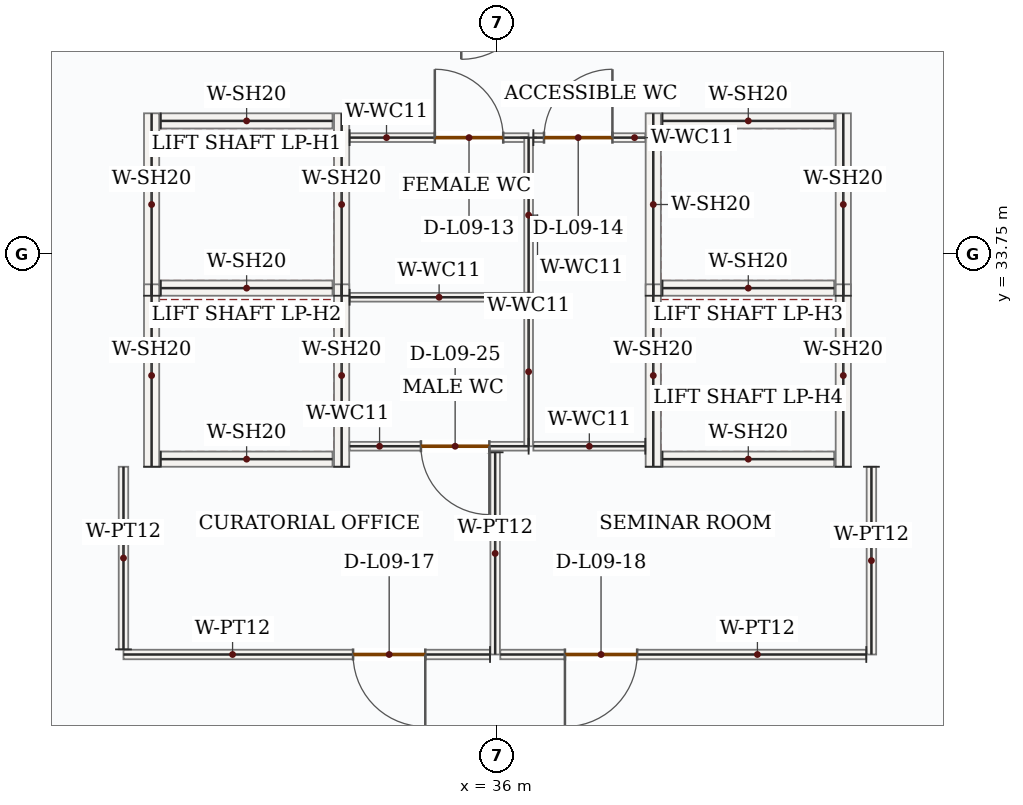
"""IFC4 building model, lengths in metres.
Left out: names, types, materials, properties, quantities, classifications, styles, units other than length and angle.
Written with IfcOpenShell. Run it as: python <this file> out.ifc"""

import sys

from ifc_helpers import new_model, si_unit, direction, frame, frame_2d, origin, place, context, subcontext, project, spatial, rectangle, extrude, source, transform, mapped, element, fill, save


model = new_model("IFC4")
c1 = context("Model", 3, precision=1e-05, world=origin(), true_north=direction((0.0, 1.0)))
c2 = subcontext(c1, "Body", "Model", "MODEL_VIEW")
j1 = project(units=[si_unit("LENGTHUNIT", "METRE"), si_unit("PLANEANGLEUNIT", "RADIAN")], contexts=[c1])
p1 = place(None, origin())
s1 = spatial("IfcSite", under=j1, at=p1, CompositionType="ELEMENT")
p2 = place(p1, origin())
s2 = spatial("IfcBuilding", under=s1, at=p2, CompositionType="ELEMENT")
p3 = place(p2, frame((0.0, 0.0, 45.9)))
s3 = spatial("IfcBuildingStorey", under=s2, at=p3, CompositionType="ELEMENT", Elevation=45.9)
m1 = source(origin(), c2, "Body", "SweptSolid", [
    extrude(rectangle(XDim=2.4, YDim=0.2, at=frame_2d((1.2, 0.0))), origin(), (0.0, 0.0, 1.0), 3.95),
])
for number, where, z_axis, x_axis in (
    (1, (31.45, 33.2, 0.0), (0.0, 0.0, 1.0), (0.0, 1.0, 0.0)),
    (2, (33.95, 33.2, 0.0), (0.0, 0.0, 1.0), (0.0, 1.0, 0.0)),
):
    element("IfcWall", number, at=place(p3, frame(where, z_axis=z_axis, x_axis=x_axis)), inside=s3, PredefinedType="SOLIDWALL", context=c2, shape_type="MappedRepresentation", body=[
        mapped(m1, transform((0.0, 0.0, 0.0), x_axis=(1.0, 0.0, 0.0), y_axis=(0.0, 1.0, 0.0), z_axis=(0.0, 0.0, 1.0), scale=1.0)),
    ])
m2 = source(origin(), c2, "Body", "SweptSolid", [
    extrude(rectangle(XDim=2.26, YDim=0.2, at=frame_2d((1.13, 0.0))), origin(), (0.0, 0.0, 1.0), 3.95),
])
for number, where, z_axis, x_axis in (
    (3, (31.57, 33.3, 0.0), (0.0, 0.0, 1.0), (1.0, 0.0, 0.0)),
    (4, (31.57, 35.5, 0.0), (0.0, 0.0, 1.0), (1.0, 0.0, 0.0)),
):
    element("IfcWall", number, at=place(p3, frame(where, z_axis=z_axis, x_axis=x_axis)), inside=s3, PredefinedType="SOLIDWALL", context=c2, shape_type="MappedRepresentation", body=[
        mapped(m2, transform((0.0, 0.0, 0.0), x_axis=(1.0, 0.0, 0.0), y_axis=(0.0, 1.0, 0.0), z_axis=(0.0, 0.0, 1.0), scale=1.0)),
    ])
for number, where, z_axis, x_axis in (
    (5, (31.45, 30.95, 0.0), (0.0, 0.0, 1.0), (0.0, 1.0, 0.0)),
    (6, (33.95, 30.95, 0.0), (0.0, 0.0, 1.0), (0.0, 1.0, 0.0)),
):
    element("IfcWall", number, at=place(p3, frame(where, z_axis=z_axis, x_axis=x_axis)), inside=s3, PredefinedType="SOLIDWALL", context=c2, shape_type="MappedRepresentation", body=[
        mapped(m1, transform((0.0, 0.0, 0.0), x_axis=(1.0, 0.0, 0.0), y_axis=(0.0, 1.0, 0.0), z_axis=(0.0, 0.0, 1.0), scale=1.0)),
    ])
p4 = place(p3, frame((31.57, 31.05, 0.0), z_axis=(0.0, 0.0, 1.0), x_axis=(1.0, 0.0, 0.0)))
e7 = element("IfcWall", 7, at=p4, inside=s3, PredefinedType="SOLIDWALL", context=c2, shape_type="MappedRepresentation", body=[
    mapped(m2, transform((0.0, 0.0, 0.0), x_axis=(1.0, 0.0, 0.0), y_axis=(0.0, 1.0, 0.0), z_axis=(0.0, 0.0, 1.0), scale=1.0)),
])
for number, where, z_axis, x_axis in (
    (8, (38.05, 33.2, 0.0), (0.0, 0.0, 1.0), (0.0, 1.0, 0.0)),
    (9, (40.55, 33.2, 0.0), (0.0, 0.0, 1.0), (0.0, 1.0, 0.0)),
):
    element("IfcWall", number, at=place(p3, frame(where, z_axis=z_axis, x_axis=x_axis)), inside=s3, PredefinedType="SOLIDWALL", context=c2, shape_type="MappedRepresentation", body=[
        mapped(m1, transform((0.0, 0.0, 0.0), x_axis=(1.0, 0.0, 0.0), y_axis=(0.0, 1.0, 0.0), z_axis=(0.0, 0.0, 1.0), scale=1.0)),
    ])
for number, where, z_axis, x_axis in (
    (10, (38.17, 33.3, 0.0), (0.0, 0.0, 1.0), (1.0, 0.0, 0.0)),
    (11, (38.17, 35.5, 0.0), (0.0, 0.0, 1.0), (1.0, 0.0, 0.0)),
):
    element("IfcWall", number, at=place(p3, frame(where, z_axis=z_axis, x_axis=x_axis)), inside=s3, PredefinedType="SOLIDWALL", context=c2, shape_type="MappedRepresentation", body=[
        mapped(m2, transform((0.0, 0.0, 0.0), x_axis=(1.0, 0.0, 0.0), y_axis=(0.0, 1.0, 0.0), z_axis=(0.0, 0.0, 1.0), scale=1.0)),
    ])
for number, where, z_axis, x_axis in (
    (12, (38.05, 30.95, 0.0), (0.0, 0.0, 1.0), (0.0, 1.0, 0.0)),
    (13, (40.55, 30.95, 0.0), (0.0, 0.0, 1.0), (0.0, 1.0, 0.0)),
):
    element("IfcWall", number, at=place(p3, frame(where, z_axis=z_axis, x_axis=x_axis)), inside=s3, PredefinedType="SOLIDWALL", context=c2, shape_type="MappedRepresentation", body=[
        mapped(m1, transform((0.0, 0.0, 0.0), x_axis=(1.0, 0.0, 0.0), y_axis=(0.0, 1.0, 0.0), z_axis=(0.0, 0.0, 1.0), scale=1.0)),
    ])
p5 = place(p3, frame((38.17, 31.05, 0.0), z_axis=(0.0, 0.0, 1.0), x_axis=(1.0, 0.0, 0.0)))
e14 = element("IfcWall", 14, at=p5, inside=s3, PredefinedType="SOLIDWALL", context=c2, shape_type="MappedRepresentation", body=[
    mapped(m2, transform((0.0, 0.0, 0.0), x_axis=(1.0, 0.0, 0.0), y_axis=(0.0, 1.0, 0.0), z_axis=(0.0, 0.0, 1.0), scale=1.0)),
])
p6 = place(p3, frame((36.41, 31.22, 0.0), z_axis=(0.0, 0.0, 1.0), x_axis=(-1.0, 0.0, 0.0)))
e15 = element("IfcWall", 15, at=p6, inside=s3, PredefinedType="PARTITIONING", context=c2, shape_type="SweptSolid", body=[
    extrude(rectangle(XDim=2.355, YDim=0.115, at=frame_2d((1.177, 0.0))), origin(), (0.0, 0.0, 1.0), 3.95),
])
p7 = place(p6, frame((0.517, 0.0, 0.0)))
e16 = element("IfcOpeningElement", 16, at=p7, cuts=e15, PredefinedType="OPENING", context=c2, shape_type="SweptSolid", body=[
    extrude(rectangle(XDim=0.9, YDim=2.1, at=frame_2d((0.45, 1.05))), frame((0.0, 0.067, 0.0), z_axis=(0.0, -1.0, 0.0), x_axis=(1.0, 0.0, 0.0)), (0.0, 0.0, 1.0), 0.135),
])
m3 = source(origin(), c2, "Body", "SweptSolid", [
    extrude(rectangle(XDim=2.355, YDim=0.115, at=frame_2d((1.177, 0.0))), origin(), (0.0, 0.0, 1.0), 3.95),
])
p8 = place(p3, frame((34.055, 33.18, 0.0), z_axis=(0.0, 0.0, 1.0), x_axis=(1.0, 0.0, 0.0)))
e17 = element("IfcWall", 17, at=p8, inside=s3, PredefinedType="PARTITIONING", context=c2, shape_type="MappedRepresentation", body=[
    mapped(m3, transform((0.0, 0.0, 0.0), x_axis=(1.0, 0.0, 0.0), y_axis=(0.0, 1.0, 0.0), z_axis=(0.0, 0.0, 1.0), scale=1.0)),
])
m4 = source(origin(), c2, "Body", "SweptSolid", [
    extrude(rectangle(XDim=1.96, YDim=0.115, at=frame_2d((0.98, 0.0))), origin(), (0.0, 0.0, 1.0), 3.95),
])
p9 = place(p3, frame((36.41, 33.18, 0.0), z_axis=(0.0, 0.0, 1.0), x_axis=(0.0, -1.0, 0.0)))
e18 = element("IfcWall", 18, at=p9, inside=s3, PredefinedType="PARTITIONING", context=c2, shape_type="MappedRepresentation", body=[
    mapped(m4, transform((0.0, 0.0, 0.0), x_axis=(1.0, 0.0, 0.0), y_axis=(0.0, 1.0, 0.0), z_axis=(0.0, 0.0, 1.0), scale=1.0)),
])
p10 = place(p3, frame((34.055, 35.28, 0.0), z_axis=(0.0, 0.0, 1.0), x_axis=(1.0, 0.0, 0.0)))
e19 = element("IfcWall", 19, at=p10, inside=s3, PredefinedType="PARTITIONING", context=c2, shape_type="SweptSolid", body=[
    extrude(rectangle(XDim=2.355, YDim=0.115, at=frame_2d((1.177, 0.0))), origin(), (0.0, 0.0, 1.0), 3.95),
])
p11 = place(p10, frame((1.121, 0.0, 0.0)))
e20 = element("IfcOpeningElement", 20, at=p11, cuts=e19, PredefinedType="OPENING", context=c2, shape_type="SweptSolid", body=[
    extrude(rectangle(XDim=0.9, YDim=2.1, at=frame_2d((0.45, 1.05))), frame((0.0, 0.067, 0.0), z_axis=(0.0, -1.0, 0.0), x_axis=(1.0, 0.0, 0.0)), (0.0, 0.0, 1.0), 0.135),
])
m5 = source(origin(), c2, "Body", "SweptSolid", [
    extrude(rectangle(XDim=2.04, YDim=0.115, at=frame_2d((1.02, 0.0))), origin(), (0.0, 0.0, 1.0), 3.95),
])
p12 = place(p3, frame((36.41, 35.28, 0.0), z_axis=(0.0, 0.0, 1.0), x_axis=(0.0, -1.0, 0.0)))
e21 = element("IfcWall", 21, at=p12, inside=s3, PredefinedType="PARTITIONING", context=c2, shape_type="MappedRepresentation", body=[
    mapped(m5, transform((0.0, 0.0, 0.0), x_axis=(1.0, 0.0, 0.0), y_axis=(0.0, 1.0, 0.0), z_axis=(0.0, 0.0, 1.0), scale=1.0)),
])
m6 = source(origin(), c2, "Body", "SweptSolid", [
    extrude(rectangle(XDim=1.473, YDim=0.115, at=frame_2d((0.736, 0.0))), origin(), (0.0, 0.0, 1.0), 3.95),
])
p13 = place(p3, frame((37.945, 31.22, 0.0), z_axis=(0.0, 0.0, 1.0), x_axis=(-1.0, 0.0, 0.0)))
e22 = element("IfcWall", 22, at=p13, inside=s3, PredefinedType="PARTITIONING", context=c2, shape_type="MappedRepresentation", body=[
    mapped(m6, transform((0.0, 0.0, 0.0), x_axis=(1.0, 0.0, 0.0), y_axis=(0.0, 1.0, 0.0), z_axis=(0.0, 0.0, 1.0), scale=1.0)),
])
p14 = place(p3, frame((36.472, 35.28, 0.0), z_axis=(0.0, 0.0, 1.0), x_axis=(1.0, 0.0, 0.0)))
e23 = element("IfcWall", 23, at=p14, inside=s3, PredefinedType="PARTITIONING", context=c2, shape_type="SweptSolid", body=[
    extrude(rectangle(XDim=1.473, YDim=0.115, at=frame_2d((0.736, 0.0))), origin(), (0.0, 0.0, 1.0), 3.95),
])
p15 = place(p14, frame((0.14, 0.0, 0.0)))
e24 = element("IfcOpeningElement", 24, at=p15, cuts=e23, PredefinedType="OPENING", context=c2, shape_type="SweptSolid", body=[
    extrude(rectangle(XDim=0.9, YDim=2.1, at=frame_2d((0.45, 1.05))), frame((0.0, 0.067, 0.0), z_axis=(0.0, -1.0, 0.0), x_axis=(1.0, 0.0, 0.0)), (0.0, 0.0, 1.0), 0.135),
])
m7 = source(origin(), c2, "Body", "SweptSolid", [
    extrude(rectangle(XDim=2.66, YDim=0.125, at=frame_2d((1.33, 0.0))), origin(), (0.0, 0.0, 1.0), 3.95),
])
p16 = place(p3, frame((35.97, 31.14, 0.0), z_axis=(0.0, 0.0, 1.0), x_axis=(0.0, -1.0, 0.0)))
e25 = element("IfcWall", 25, at=p16, inside=s3, PredefinedType="PARTITIONING", context=c2, shape_type="MappedRepresentation", body=[
    mapped(m7, transform((0.0, 0.0, 0.0), x_axis=(1.0, 0.0, 0.0), y_axis=(0.0, 1.0, 0.0), z_axis=(0.0, 0.0, 1.0), scale=1.0)),
])
p17 = place(p3, frame((35.903, 28.48, 0.0), z_axis=(0.0, 0.0, 1.0), x_axis=(-1.0, 0.0, 0.0)))
e26 = element("IfcWall", 26, at=p17, inside=s3, PredefinedType="PARTITIONING", context=c2, shape_type="SweptSolid", body=[
    extrude(rectangle(XDim=4.823, YDim=0.125, at=frame_2d((2.411, 0.0))), origin(), (0.0, 0.0, 1.0), 3.95),
])
p18 = place(p17, frame((0.852, 0.0, 0.0)))
e27 = element("IfcOpeningElement", 27, at=p18, cuts=e26, PredefinedType="OPENING", context=c2, shape_type="SweptSolid", body=[
    extrude(rectangle(XDim=0.95, YDim=2.15, at=frame_2d((0.475, 1.075))), frame((0.0, 0.073, 0.0), z_axis=(0.0, -1.0, 0.0), x_axis=(1.0, 0.0, 0.0)), (0.0, 0.0, 1.0), 0.145),
])
m8 = source(origin(), c2, "Body", "SweptSolid", [
    extrude(rectangle(XDim=2.402, YDim=0.125, at=frame_2d((1.201, 0.0))), origin(), (0.0, 0.0, 1.0), 3.95),
])
p19 = place(p3, frame((31.08, 28.548, 0.0), z_axis=(0.0, 0.0, 1.0), x_axis=(0.0, 1.0, 0.0)))
e28 = element("IfcWall", 28, at=p19, inside=s3, PredefinedType="PARTITIONING", context=c2, shape_type="MappedRepresentation", body=[
    mapped(m8, transform((0.0, 0.0, 0.0), x_axis=(1.0, 0.0, 0.0), y_axis=(0.0, 1.0, 0.0), z_axis=(0.0, 0.0, 1.0), scale=1.0)),
])
m9 = source(origin(), c2, "Body", "SweptSolid", [
    extrude(rectangle(XDim=2.47, YDim=0.125, at=frame_2d((1.235, 0.0))), origin(), (0.0, 0.0, 1.0), 3.95),
])
p20 = place(p3, frame((40.92, 30.95, 0.0), z_axis=(0.0, 0.0, 1.0), x_axis=(0.0, -1.0, 0.0)))
e29 = element("IfcWall", 29, at=p20, inside=s3, PredefinedType="PARTITIONING", context=c2, shape_type="MappedRepresentation", body=[
    mapped(m9, transform((0.0, 0.0, 0.0), x_axis=(1.0, 0.0, 0.0), y_axis=(0.0, 1.0, 0.0), z_axis=(0.0, 0.0, 1.0), scale=1.0)),
])
p21 = place(p3, frame((40.853, 28.48, 0.0), z_axis=(0.0, 0.0, 1.0), x_axis=(-1.0, 0.0, 0.0)))
e30 = element("IfcWall", 30, at=p21, inside=s3, PredefinedType="PARTITIONING", context=c2, shape_type="SweptSolid", body=[
    extrude(rectangle(XDim=4.815, YDim=0.125, at=frame_2d((2.407, 0.0))), origin(), (0.0, 0.0, 1.0), 3.95),
])
p22 = place(p21, frame((3.015, 0.0, 0.0)))
e31 = element("IfcOpeningElement", 31, at=p22, cuts=e30, PredefinedType="OPENING", context=c2, shape_type="SweptSolid", body=[
    extrude(rectangle(XDim=0.95, YDim=2.15, at=frame_2d((0.475, 1.075))), frame((0.0, 0.073, 0.0), z_axis=(0.0, -1.0, 0.0), x_axis=(1.0, 0.0, 0.0)), (0.0, 0.0, 1.0), 0.145),
])
m10 = source(origin(), c2, "Body", "SweptSolid", [
    extrude(rectangle(XDim=0.9, YDim=2.1, at=frame_2d((0.45, 1.05))), frame((0.0, 0.025, 0.0), z_axis=(0.0, -1.0, 0.0), x_axis=(1.0, 0.0, 0.0)), (0.0, 0.0, 1.0), 0.05),
])
p23 = place(p11, origin())
e32 = element("IfcDoor", 32, at=p23, inside=s3, OperationType="SINGLE_SWING_LEFT", PredefinedType="DOOR", context=c2, shape_type="MappedRepresentation", body=[
    mapped(m10, transform((0.0, 0.0, 0.0), x_axis=(1.0, 0.0, 0.0), y_axis=(0.0, 1.0, 0.0), z_axis=(0.0, 0.0, 1.0), scale=1.0)),
])
fill(e20, e32)
p24 = place(p15, origin())
e33 = element("IfcDoor", 33, at=p24, inside=s3, OperationType="SINGLE_SWING_RIGHT", PredefinedType="DOOR", context=c2, shape_type="MappedRepresentation", body=[
    mapped(m10, transform((0.0, 0.0, 0.0), x_axis=(1.0, 0.0, 0.0), y_axis=(0.0, 1.0, 0.0), z_axis=(0.0, 0.0, 1.0), scale=1.0)),
])
fill(e24, e33)
m11 = source(origin(), c2, "Body", "SweptSolid", [
    extrude(rectangle(XDim=0.95, YDim=2.15, at=frame_2d((0.475, 1.075))), frame((0.0, 0.025, 0.0), z_axis=(0.0, -1.0, 0.0), x_axis=(1.0, 0.0, 0.0)), (0.0, 0.0, 1.0), 0.05),
])
p25 = place(p18, origin())
e34 = element("IfcDoor", 34, at=p25, inside=s3, OperationType="SINGLE_SWING_LEFT", PredefinedType="DOOR", context=c2, shape_type="MappedRepresentation", body=[
    mapped(m11, transform((0.0, 0.0, 0.0), x_axis=(1.0, 0.0, 0.0), y_axis=(0.0, 1.0, 0.0), z_axis=(0.0, 0.0, 1.0), scale=1.0)),
])
fill(e27, e34)
p26 = place(p22, origin())
e35 = element("IfcDoor", 35, at=p26, inside=s3, OperationType="SINGLE_SWING_RIGHT", PredefinedType="DOOR", context=c2, shape_type="MappedRepresentation", body=[
    mapped(m11, transform((0.0, 0.0, 0.0), x_axis=(1.0, 0.0, 0.0), y_axis=(0.0, 1.0, 0.0), z_axis=(0.0, 0.0, 1.0), scale=1.0)),
])
fill(e31, e35)
p27 = place(p7, origin())
e36 = element("IfcDoor", 36, at=p27, inside=s3, OperationType="SINGLE_SWING_LEFT", PredefinedType="DOOR", context=c2, shape_type="MappedRepresentation", body=[
    mapped(m10, transform((0.0, 0.0, 0.0), x_axis=(1.0, 0.0, 0.0), y_axis=(0.0, 1.0, 0.0), z_axis=(0.0, 0.0, 1.0), scale=1.0)),
])
fill(e16, e36)
save(model, sys.argv[1])
